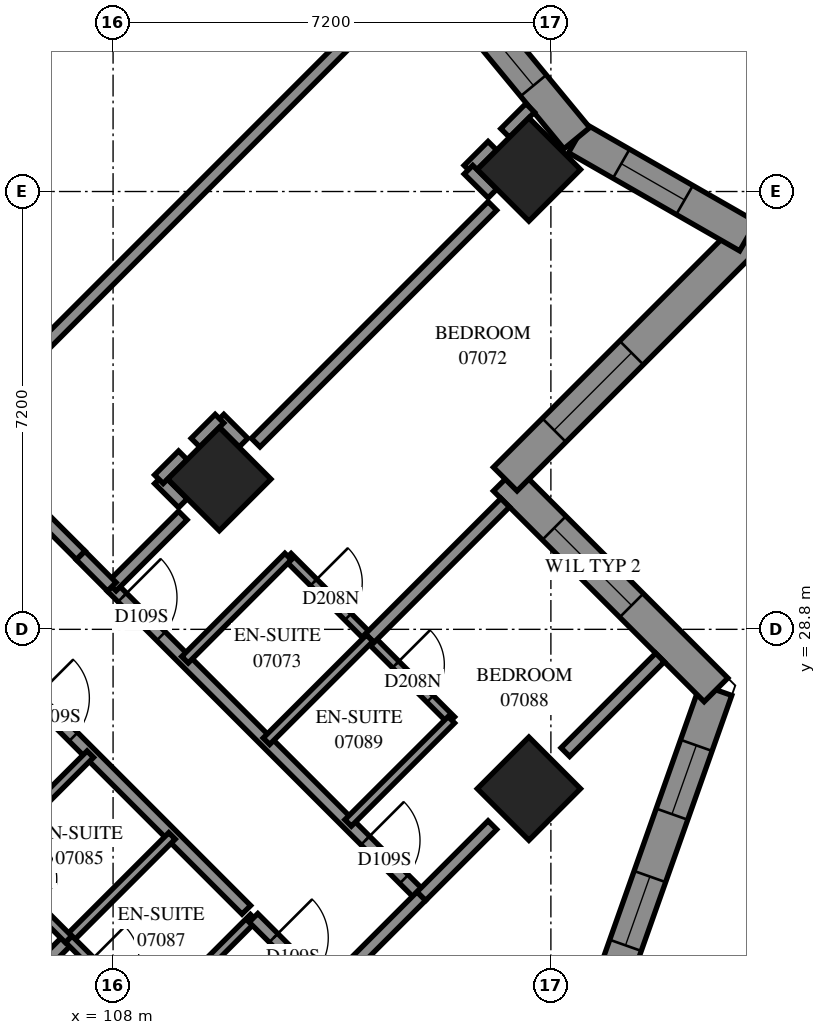
"""IFC4 building model, lengths in metres.
Left out: names, types, materials, properties, quantities, classifications, styles, units other than length and angle.
Written with IfcOpenShell. Run it as: python <this file> out.ifc"""

import sys

from ifc_helpers import new_model, si_unit, direction, frame, frame_2d, origin, origin_2d, place, context, subcontext, project, spatial, polyline, rectangle, outline, extrude, element, fill, save


model = new_model("IFC4")
c1 = context("Model", 3, precision=1e-05, world=origin(), true_north=direction((0.0, 1.0)))
c2 = subcontext(c1, "Body", "Model", "MODEL_VIEW")
j1 = project(units=[si_unit("LENGTHUNIT", "METRE"), si_unit("PLANEANGLEUNIT", "RADIAN")], contexts=[c1])
p1 = place(None, origin())
s1 = spatial("IfcSite", under=j1, at=p1, CompositionType="ELEMENT")
p2 = place(p1, origin())
s2 = spatial("IfcBuilding", under=s1, at=p2, CompositionType="ELEMENT")
p3 = place(p2, frame((0.0, 0.0, 30.4)))
s3 = spatial("IfcBuildingStorey", under=s2, at=p3, CompositionType="ELEMENT", Elevation=30.4)
for number, where, z_axis, x_axis in (
    (1, (114.838, 36.362, 0.0), (0.0, 0.0, 1.0), (0.707, -0.707, 0.0)),
    (2, (109.747, 31.271, 0.0), (0.0, 0.0, 1.0), (0.707, -0.707, 0.0)),
    (3, (114.838, 26.18, 0.0), (0.0, 0.0, 1.0), (0.707, -0.707, 0.0)),
):
    element("IfcColumn", number, at=place(p3, frame(where, z_axis=z_axis, x_axis=x_axis)), inside=s3, PredefinedType="COLUMN", context=c2, shape_type="SweptSolid", body=[
        extrude(rectangle(XDim=1.2, YDim=1.2, at=origin_2d()), origin(), (0.0, 0.0, 1.0), 3.1),
    ])
p4 = place(p3, frame((116.153, 22.831, 0.0), z_axis=(0.0, 0.0, 1.0), x_axis=(0.3338727536, 0.9426181541, 0.0)))
e4 = element("IfcWall", 4, at=p4, inside=s3, PredefinedType="SOLIDWALL", context=c2, shape_type="SweptSolid", body=[
    extrude(outline(polyline([(-0.126, -0.275), (5.45, -0.275), (5.103, 0.275), (0.126, 0.275), (-0.126, -0.275)])), origin(), (0.0, 0.0, 1.0), 3.1),
])
p5 = place(p4, frame((0.819, 0.0, 0.5)))
e5 = element("IfcOpeningElement", 5, at=p5, cuts=e4, PredefinedType="OPENING", context=c2, shape_type="SweptSolid", body=[
    extrude(rectangle(XDim=1.2, YDim=2.45, at=frame_2d((0.6, 1.225))), frame((0.0, 0.285, 0.0), z_axis=(0.0, -1.0, 0.0), x_axis=(1.0, 0.0, 0.0)), (0.0, 0.0, 1.0), 0.57),
])
p6 = place(p4, frame((3.108, 0.0, 0.5)))
e6 = element("IfcOpeningElement", 6, at=p6, cuts=e4, PredefinedType="OPENING", context=c2, shape_type="SweptSolid", body=[
    extrude(rectangle(XDim=1.2, YDim=2.45, at=frame_2d((0.6, 1.225))), frame((0.0, 0.285, 0.0), z_axis=(0.0, -1.0, 0.0), x_axis=(1.0, 0.0, 0.0)), (0.0, 0.0, 1.0), 0.57),
])
p7 = place(p3, frame((117.915, 27.805, 0.0), z_axis=(0.0, 0.0, 1.0), x_axis=(-0.7070965801, 0.7071169822, 0.0)))
e7 = element("IfcWall", 7, at=p7, inside=s3, PredefinedType="SOLIDWALL", context=c2, shape_type="SweptSolid", body=[
    extrude(outline(polyline([(-0.173, -0.275), (4.627, -0.275), (5.176, 0.275), (0.173, 0.275), (-0.173, -0.275)])), origin(), (0.0, 0.0, 1.0), 3.1),
])
p8 = place(p7, frame((1.964, 0.0, 0.6)))
e8 = element("IfcOpeningElement", 8, at=p8, cuts=e7, PredefinedType="OPENING", context=c2, shape_type="SweptSolid", body=[
    extrude(rectangle(XDim=1.8, YDim=1.9, at=frame_2d((0.9, 0.95))), frame((0.0, 0.285, 0.0), z_axis=(0.0, -1.0, 0.0), x_axis=(1.0, 0.0, 0.0)), (0.0, 0.0, 1.0), 0.57),
])
p9 = place(p3, frame((114.449, 31.271, 0.0), z_axis=(0.0, 0.0, 1.0), x_axis=(0.7070979247, 0.7071156376, 0.0)))
e9 = element("IfcWall", 9, at=p9, inside=s3, PredefinedType="SOLIDWALL", context=c2, shape_type="SweptSolid", body=[
    extrude(outline(polyline([(0.275, -0.275), (6.005, -0.275), (5.286, 0.275), (-0.275, 0.275), (0.275, -0.275)])), origin(), (0.0, 0.0, 1.0), 3.1),
])
p10 = place(p9, frame((1.137, 0.0, 0.6)))
e10 = element("IfcOpeningElement", 10, at=p10, cuts=e9, PredefinedType="OPENING", context=c2, shape_type="SweptSolid", body=[
    extrude(rectangle(XDim=1.8, YDim=1.9, at=frame_2d((0.9, 0.95))), frame((0.0, 0.285, 0.0), z_axis=(0.0, -1.0, 0.0), x_axis=(1.0, 0.0, 0.0)), (0.0, 0.0, 1.0), 0.57),
])
p11 = place(p3, frame((118.441, 35.263, 0.0), z_axis=(0.0, 0.0, 1.0), x_axis=(-0.8675063131, 0.4974261721, 0.0)))
e11 = element("IfcWall", 11, at=p11, inside=s3, PredefinedType="SOLIDWALL", context=c2, shape_type="SweptSolid", body=[
    extrude(outline(polyline([(-0.359, -0.275), (3.195, -0.275), (3.295, 0.275), (0.359, 0.275), (-0.359, -0.275)])), origin(), (0.0, 0.0, 1.0), 3.1),
])
p12 = place(p11, frame((1.202, 0.0, 0.5)))
e12 = element("IfcOpeningElement", 12, at=p12, cuts=e11, PredefinedType="OPENING", context=c2, shape_type="SweptSolid", body=[
    extrude(rectangle(XDim=1.2, YDim=2.45, at=frame_2d((0.6, 1.225))), frame((0.0, 0.285, 0.0), z_axis=(0.0, -1.0, 0.0), x_axis=(1.0, 0.0, 0.0)), (0.0, 0.0, 1.0), 0.57),
])
p13 = place(p3, frame((115.626, 36.877, 0.0), z_axis=(0.0, 0.0, 1.0), x_axis=(-0.6361415501, 0.7715723739, 0.0)))
e13 = element("IfcWall", 13, at=p13, inside=s3, PredefinedType="SOLIDWALL", context=c2, shape_type="SweptSolid", body=[
    extrude(outline(polyline([(0.05, -0.275), (3.496, -0.275), (3.443, 0.275), (-0.05, 0.275), (0.05, -0.275)])), origin(), (0.0, 0.0, 1.0), 3.1),
])
p14 = place(p13, frame((1.122, 0.0, 0.5)))
e14 = element("IfcOpeningElement", 14, at=p14, cuts=e13, PredefinedType="OPENING", context=c2, shape_type="SweptSolid", body=[
    extrude(rectangle(XDim=1.2, YDim=2.45, at=frame_2d((0.6, 1.225))), frame((0.0, 0.285, 0.0), z_axis=(0.0, -1.0, 0.0), x_axis=(1.0, 0.0, 0.0)), (0.0, 0.0, 1.0), 0.57),
])
p15 = place(p3, frame((102.609, 31.769, 0.0), z_axis=(0.0, 0.0, 1.0), x_axis=(0.7071067812, -0.7071067812, 0.0)))
e15 = element("IfcWall", 15, at=p15, inside=s3, PredefinedType="PARTITIONING", context=c2, shape_type="SweptSolid", body=[
    extrude(rectangle(XDim=10.723, YDim=0.2, at=frame_2d((5.361, 0.0))), origin(), (0.0, 0.0, 1.0), 3.1),
])
p16 = place(p15, frame((4.15, 0.0, 0.0)))
e16 = element("IfcOpeningElement", 16, at=p16, cuts=e15, PredefinedType="OPENING", context=c2, shape_type="SweptSolid", body=[
    extrude(rectangle(XDim=0.9, YDim=2.1, at=frame_2d((0.45, 1.05))), frame((0.0, 0.11, 0.0), z_axis=(0.0, -1.0, 0.0), x_axis=(1.0, 0.0, 0.0)), (0.0, 0.0, 1.0), 0.22),
])
p17 = place(p15, frame((5.8, 0.0, 0.0)))
e17 = element("IfcOpeningElement", 17, at=p17, cuts=e15, PredefinedType="OPENING", context=c2, shape_type="SweptSolid", body=[
    extrude(rectangle(XDim=0.9, YDim=2.1, at=frame_2d((0.45, 1.05))), frame((0.0, 0.11, 0.0), z_axis=(0.0, -1.0, 0.0), x_axis=(1.0, 0.0, 0.0)), (0.0, 0.0, 1.0), 0.22),
])
p18 = place(p3, frame((105.437, 32.045, 0.0), z_axis=(0.0, 0.0, 1.0), x_axis=(0.7070175341, 0.707196017, 0.0)))
e18 = element("IfcWall", 18, at=p18, inside=s3, PredefinedType="PARTITIONING", context=c2, shape_type="SweptSolid", body=[
    extrude(rectangle(XDim=10.645, YDim=0.2, at=frame_2d((5.323, 0.0))), origin(), (0.0, 0.0, 1.0), 3.1),
])
p19 = place(p3, frame((101.592, 18.033, 0.0), z_axis=(0.0, 0.0, 1.0), x_axis=(0.7072375867, 0.7069759514, 0.0)))
e19 = element("IfcWall", 19, at=p19, inside=s3, PredefinedType="PARTITIONING", context=c2, shape_type="SweptSolid", body=[
    extrude(rectangle(XDim=8.026, YDim=0.2, at=frame_2d((4.013, 0.0))), origin(), (0.0, 0.0, 1.0), 3.1),
])
p20 = place(p3, frame((107.977, 29.499, 0.0), z_axis=(0.0, 0.0, 1.0), x_axis=(0.7071067812, -0.7071067812, 0.0)))
e20 = element("IfcWall", 20, at=p20, inside=s3, PredefinedType="PARTITIONING", context=c2, shape_type="SweptSolid", body=[
    extrude(rectangle(XDim=7.198, YDim=0.2, at=frame_2d((3.599, 0.0))), origin(), (0.0, 0.0, 1.0), 3.1),
])
p21 = place(p20, frame((0.247, 0.0, 0.0)))
e21 = element("IfcOpeningElement", 21, at=p21, cuts=e20, PredefinedType="OPENING", context=c2, shape_type="SweptSolid", body=[
    extrude(rectangle(XDim=0.9, YDim=2.1, at=frame_2d((0.45, 1.05))), frame((0.0, 0.11, 0.0), z_axis=(0.0, -1.0, 0.0), x_axis=(1.0, 0.0, 0.0)), (0.0, 0.0, 1.0), 0.22),
])
p22 = place(p20, frame((5.899, 0.0, 0.0)))
e22 = element("IfcOpeningElement", 22, at=p22, cuts=e20, PredefinedType="OPENING", context=c2, shape_type="SweptSolid", body=[
    extrude(rectangle(XDim=0.9, YDim=2.1, at=frame_2d((0.45, 1.05))), frame((0.0, 0.11, 0.0), z_axis=(0.0, -1.0, 0.0), x_axis=(1.0, 0.0, 0.0)), (0.0, 0.0, 1.0), 0.22),
])
p23 = place(p3, frame((110.345, 31.871, 0.0), z_axis=(0.0, 0.0, 1.0), x_axis=(0.7071067812, 0.7071067812, 0.0)))
e23 = element("IfcWall", 23, at=p23, inside=s3, PredefinedType="PARTITIONING", context=c2, shape_type="SweptSolid", body=[
    extrude(rectangle(XDim=5.504, YDim=0.2, at=frame_2d((2.752, 0.0))), origin(), (0.0, 0.0, 1.0), 3.1),
])
p24 = place(p3, frame((110.875, 29.995, 0.0), z_axis=(0.0, 0.0, 1.0), x_axis=(0.7071067812, -0.7071067812, 0.0)))
e24 = element("IfcWall", 24, at=p24, inside=s3, PredefinedType="PARTITIONING", context=c2, shape_type="SweptSolid", body=[
    extrude(rectangle(XDim=3.801, YDim=0.15, at=frame_2d((1.901, 0.0))), origin(), (0.0, 0.0, 1.0), 3.1),
])
p25 = place(p24, frame((0.598, 0.0, 0.0)))
e25 = element("IfcOpeningElement", 25, at=p25, cuts=e24, PredefinedType="OPENING", context=c2, shape_type="SweptSolid", body=[
    extrude(rectangle(XDim=0.8, YDim=2.1, at=frame_2d((0.4, 1.05))), frame((0.0, 0.085, 0.0), z_axis=(0.0, -1.0, 0.0), x_axis=(1.0, 0.0, 0.0)), (0.0, 0.0, 1.0), 0.17),
])
p26 = place(p24, frame((2.507, 0.0, 0.0)))
e26 = element("IfcOpeningElement", 26, at=p26, cuts=e24, PredefinedType="OPENING", context=c2, shape_type="SweptSolid", body=[
    extrude(rectangle(XDim=0.8, YDim=2.1, at=frame_2d((0.4, 1.05))), frame((0.0, 0.085, 0.0), z_axis=(0.0, -1.0, 0.0), x_axis=(1.0, 0.0, 0.0)), (0.0, 0.0, 1.0), 0.17),
])
p27 = place(p3, frame((112.221, 28.655, 0.0), z_axis=(0.0, 0.0, 1.0), x_axis=(0.7071067812, 0.7071067812, 0.0)))
e27 = element("IfcWall", 27, at=p27, inside=s3, PredefinedType="PARTITIONING", context=c2, shape_type="SweptSolid", body=[
    extrude(rectangle(XDim=3.15, YDim=0.2, at=frame_2d((1.575, 0.0))), origin(), (0.0, 0.0, 1.0), 3.1),
])
p28 = place(p3, frame((105.435, 32.049, 0.0), z_axis=(0.0, 0.0, 1.0), x_axis=(0.7074545101, -0.7067588812, 0.0)))
e28 = element("IfcWall", 28, at=p28, inside=s3, PredefinedType="PARTITIONING", context=c2, shape_type="SweptSolid", body=[
    extrude(rectangle(XDim=2.875, YDim=0.2, at=frame_2d((1.438, 0.0))), origin(), (0.0, 0.0, 1.0), 3.1),
])
for number, where, z_axis, x_axis in (
    (29, (105.927, 25.049, 0.0), (0.0, 0.0, 1.0), (0.707, 0.707, 0.0)),
    (30, (107.271, 23.705, 0.0), (0.0, 0.0, 1.0), (0.707, 0.707, 0.0)),
):
    element("IfcWall", number, at=place(p3, frame(where, z_axis=z_axis, x_axis=x_axis)), inside=s3, PredefinedType="PARTITIONING", context=c2, shape_type="SweptSolid", body=[
        extrude(rectangle(XDim=2.401, YDim=0.15, at=frame_2d((1.201, 0.0))), origin(), (0.0, 0.0, 1.0), 3.1),
    ])
for number, where, z_axis, x_axis in (
    (31, (109.182, 28.3, 0.0), (0.0, 0.0, 1.0), (0.707, 0.708, 0.0)),
    (32, (111.865, 25.616, 0.0), (0.0, 0.0, 1.0), (0.708, 0.707, 0.0)),
    (33, (110.522, 26.96, 0.0), (0.0, 0.0, 1.0), (0.708, 0.707, 0.0)),
):
    element("IfcWall", number, at=place(p3, frame(where, z_axis=z_axis, x_axis=x_axis)), inside=s3, PredefinedType="PARTITIONING", context=c2, shape_type="SweptSolid", body=[
        extrude(rectangle(XDim=2.4, YDim=0.15, at=frame_2d((1.2, 0.0))), origin(), (0.0, 0.0, 1.0), 3.1),
    ])
p29 = place(p3, frame((108.615, 22.363, 0.0), z_axis=(0.0, 0.0, 1.0), x_axis=(0.7071067812, 0.7071067812, 0.0)))
e34 = element("IfcWall", 34, at=p29, inside=s3, PredefinedType="PARTITIONING", context=c2, shape_type="SweptSolid", body=[
    extrude(rectangle(XDim=2.398, YDim=0.15, at=frame_2d((1.199, 0.0))), origin(), (0.0, 0.0, 1.0), 3.1),
])
p30 = place(p3, frame((111.513, 22.857, 0.0), z_axis=(0.0, 0.0, 1.0), x_axis=(0.7071067812, 0.7071067812, 0.0)))
e35 = element("IfcWall", 35, at=p30, inside=s3, PredefinedType="PARTITIONING", context=c2, shape_type="SweptSolid", body=[
    extrude(rectangle(XDim=2.2, YDim=0.2, at=frame_2d((1.1, 0.0))), origin(), (0.0, 0.0, 1.0), 2.6),
])
p31 = place(p3, frame((115.438, 26.78, 0.0), z_axis=(0.0, 0.0, 1.0), x_axis=(0.7071067812, 0.7071067812, 0.0)))
e36 = element("IfcWall", 36, at=p31, inside=s3, PredefinedType="PARTITIONING", context=c2, shape_type="SweptSolid", body=[
    extrude(rectangle(XDim=2.201, YDim=0.2, at=frame_2d((1.101, 0.0))), origin(), (0.0, 0.0, 1.0), 3.1),
])
p32 = place(p3, frame((105.925, 25.045, 0.0), z_axis=(0.0, 0.0, 1.0), x_axis=(0.7071067812, -0.7071067812, 0.0)))
e37 = element("IfcWall", 37, at=p32, inside=s3, PredefinedType="PARTITIONING", context=c2, shape_type="SweptSolid", body=[
    extrude(rectangle(XDim=1.901, YDim=0.15, at=frame_2d((0.95, 0.0))), origin(), (0.0, 0.0, 1.0), 3.1),
])
p33 = place(p32, frame((0.493, 0.0, 0.0)))
e38 = element("IfcOpeningElement", 38, at=p33, cuts=e37, PredefinedType="OPENING", context=c2, shape_type="SweptSolid", body=[
    extrude(rectangle(XDim=0.8, YDim=2.1, at=frame_2d((0.4, 1.05))), frame((0.0, 0.085, 0.0), z_axis=(0.0, -1.0, 0.0), x_axis=(1.0, 0.0, 0.0)), (0.0, 0.0, 1.0), 0.17),
])
p34 = place(p3, frame((107.272, 23.704, 0.0), z_axis=(0.0, 0.0, 1.0), x_axis=(0.7076330979, -0.7065800724, 0.0)))
e39 = element("IfcWall", 39, at=p34, inside=s3, PredefinedType="PARTITIONING", context=c2, shape_type="SweptSolid", body=[
    extrude(rectangle(XDim=1.899, YDim=0.15, at=frame_2d((0.95, 0.0))), origin(), (0.0, 0.0, 1.0), 3.1),
])
p35 = place(p34, frame((0.503, 0.0, 0.0)))
e40 = element("IfcOpeningElement", 40, at=p35, cuts=e39, PredefinedType="OPENING", context=c2, shape_type="SweptSolid", body=[
    extrude(rectangle(XDim=0.8, YDim=2.1, at=frame_2d((0.4, 1.05))), frame((0.0, 0.085, 0.0), z_axis=(0.0, -1.0, 0.0), x_axis=(1.0, 0.0, 0.0)), (0.0, 0.0, 1.0), 0.17),
])
p36 = place(p3, frame((110.309, 24.055, 0.0), z_axis=(0.0, 0.0, 1.0), x_axis=(0.7071067812, -0.7071067812, 0.0)))
e41 = element("IfcWall", 41, at=p36, inside=s3, PredefinedType="PARTITIONING", context=c2, shape_type="SweptSolid", body=[
    extrude(rectangle(XDim=1.7, YDim=0.2, at=frame_2d((0.85, 0.0))), origin(), (0.0, 0.0, 1.0), 3.1),
])
p37 = place(p36, frame((0.467, 0.0, 0.0)))
e42 = element("IfcOpeningElement", 42, at=p37, cuts=e41, PredefinedType="OPENING", context=c2, shape_type="SweptSolid", body=[
    extrude(rectangle(XDim=0.9, YDim=2.1, at=frame_2d((0.45, 1.05))), frame((0.0, 0.11, 0.0), z_axis=(0.0, -1.0, 0.0), x_axis=(1.0, 0.0, 0.0)), (0.0, 0.0, 1.0), 0.22),
])
p38 = place(p3, frame((113.07, 24.413, 0.0), z_axis=(0.0, 0.0, 1.0), x_axis=(0.7071067812, 0.7071067812, 0.0)))
e43 = element("IfcWall", 43, at=p38, inside=s3, PredefinedType="PARTITIONING", context=c2, shape_type="SweptSolid", body=[
    extrude(rectangle(XDim=1.652, YDim=0.2, at=frame_2d((0.826, 0.0))), origin(), (0.0, 0.0, 1.0), 2.6),
])
p39 = place(p3, frame((107.978, 29.504, 0.0), z_axis=(0.0, 0.0, 1.0), x_axis=(0.7071067812, 0.7071067812, 0.0)))
e44 = element("IfcWall", 44, at=p39, inside=s3, PredefinedType="PARTITIONING", context=c2, shape_type="SweptSolid", body=[
    extrude(rectangle(XDim=1.652, YDim=0.2, at=frame_2d((0.826, 0.0))), origin(), (0.0, 0.0, 1.0), 3.1),
])
p40 = place(p3, frame((107.466, 30.014, 0.0), z_axis=(0.0, 0.0, 1.0), x_axis=(0.7057270646, -0.7084838109, 0.0)))
e45 = element("IfcWall", 45, at=p40, inside=s3, PredefinedType="PARTITIONING", context=c2, shape_type="SweptSolid", body=[
    extrude(rectangle(XDim=0.726, YDim=0.2, at=frame_2d((0.363, 0.0))), origin(), (0.0, 0.0, 1.0), 3.1),
])
for number, where, z_axis, x_axis in (
    (46, (113.843, 36.359, 0.0), (0.0, 0.0, 1.0), (0.707, 0.707, 0.0)),
    (47, (108.754, 31.268, 0.0), (0.0, 0.0, 1.0), (0.707, -0.707, 0.0)),
    (48, (109.751, 32.265, 0.0), (0.0, 0.0, 1.0), (0.707, -0.707, 0.0)),
    (49, (109.355, 31.871, 0.0), (0.0, 0.0, 1.0), (0.707, 0.707, 0.0)),
    (50, (108.753, 31.269, 0.0), (0.0, 0.0, 1.0), (0.707, 0.707, 0.0)),
):
    element("IfcWall", number, at=place(p3, frame(where, z_axis=z_axis, x_axis=x_axis)), inside=s3, PredefinedType="PARTITIONING", context=c2, shape_type="SweptSolid", body=[
        extrude(rectangle(XDim=0.557, YDim=0.2, at=frame_2d((0.279, 0.0))), origin(), (0.0, 0.0, 1.0), 3.1),
    ])
p41 = place(p3, frame((113.845, 36.359, 0.0), z_axis=(0.0, 0.0, 1.0), x_axis=(0.7089037401, -0.705305244, 0.0)))
e51 = element("IfcWall", 51, at=p41, inside=s3, PredefinedType="PARTITIONING", context=c2, shape_type="SweptSolid", body=[
    extrude(rectangle(XDim=0.556, YDim=0.2, at=frame_2d((0.278, 0.0))), origin(), (0.0, 0.0, 1.0), 3.1),
])
p42 = place(p3, frame((114.447, 36.963, 0.0), z_axis=(0.0, 0.0, 1.0), x_axis=(0.7071067812, 0.7071067812, 0.0)))
e52 = element("IfcWall", 52, at=p42, inside=s3, PredefinedType="PARTITIONING", context=c2, shape_type="SweptSolid", body=[
    extrude(rectangle(XDim=0.583, YDim=0.2, at=frame_2d((0.291, 0.0))), origin(), (0.0, 0.0, 1.0), 3.1),
])
p43 = place(p5, origin())
e53 = element("IfcWindow", 53, at=p43, inside=s3, PartitioningType="SINGLE_PANEL", PredefinedType="WINDOW", context=c2, shape_type="SweptSolid", body=[
    extrude(rectangle(XDim=1.2, YDim=2.45, at=frame_2d((0.6, 1.225))), frame((0.0, 0.155, 0.0), z_axis=(0.0, -1.0, 0.0), x_axis=(1.0, 0.0, 0.0)), (0.0, 0.0, 1.0), 0.06),
])
fill(e5, e53)
p44 = place(p6, origin())
e54 = element("IfcWindow", 54, at=p44, inside=s3, PartitioningType="SINGLE_PANEL", PredefinedType="WINDOW", context=c2, shape_type="SweptSolid", body=[
    extrude(rectangle(XDim=1.2, YDim=2.45, at=frame_2d((0.6, 1.225))), frame((0.0, 0.155, 0.0), z_axis=(0.0, -1.0, 0.0), x_axis=(1.0, 0.0, 0.0)), (0.0, 0.0, 1.0), 0.06),
])
fill(e6, e54)
p45 = place(p8, origin())
e55 = element("IfcWindow", 55, at=p45, inside=s3, PartitioningType="SINGLE_PANEL", PredefinedType="WINDOW", context=c2, shape_type="SweptSolid", body=[
    extrude(rectangle(XDim=1.8, YDim=1.9, at=frame_2d((0.9, 0.95))), frame((0.0, 0.155, 0.0), z_axis=(0.0, -1.0, 0.0), x_axis=(1.0, 0.0, 0.0)), (0.0, 0.0, 1.0), 0.06),
])
fill(e8, e55)
p46 = place(p10, origin())
e56 = element("IfcWindow", 56, at=p46, inside=s3, PartitioningType="SINGLE_PANEL", PredefinedType="WINDOW", context=c2, shape_type="SweptSolid", body=[
    extrude(rectangle(XDim=1.8, YDim=1.9, at=frame_2d((0.9, 0.95))), frame((0.0, 0.155, 0.0), z_axis=(0.0, -1.0, 0.0), x_axis=(1.0, 0.0, 0.0)), (0.0, 0.0, 1.0), 0.06),
])
fill(e10, e56)
p47 = place(p12, origin())
e57 = element("IfcWindow", 57, at=p47, inside=s3, PartitioningType="SINGLE_PANEL", PredefinedType="WINDOW", context=c2, shape_type="SweptSolid", body=[
    extrude(rectangle(XDim=1.2, YDim=2.45, at=frame_2d((0.6, 1.225))), frame((0.0, 0.155, 0.0), z_axis=(0.0, -1.0, 0.0), x_axis=(1.0, 0.0, 0.0)), (0.0, 0.0, 1.0), 0.06),
])
fill(e12, e57)
p48 = place(p14, origin())
e58 = element("IfcWindow", 58, at=p48, inside=s3, PartitioningType="SINGLE_PANEL", PredefinedType="WINDOW", context=c2, shape_type="SweptSolid", body=[
    extrude(rectangle(XDim=1.2, YDim=2.45, at=frame_2d((0.6, 1.225))), frame((0.0, 0.155, 0.0), z_axis=(0.0, -1.0, 0.0), x_axis=(1.0, 0.0, 0.0)), (0.0, 0.0, 1.0), 0.06),
])
fill(e14, e58)
p49 = place(p21, origin())
e59 = element("IfcDoor", 59, at=p49, inside=s3, OperationType="SINGLE_SWING_LEFT", PredefinedType="DOOR", context=c2, shape_type="SweptSolid", body=[
    extrude(rectangle(XDim=0.9, YDim=2.1, at=frame_2d((0.45, 1.05))), frame((0.0, 0.025, 0.0), z_axis=(0.0, -1.0, 0.0), x_axis=(1.0, 0.0, 0.0)), (0.0, 0.0, 1.0), 0.05),
])
fill(e21, e59)
p50 = place(p25, origin())
e60 = element("IfcDoor", 60, at=p50, inside=s3, OperationType="SINGLE_SWING_RIGHT", PredefinedType="DOOR", context=c2, shape_type="SweptSolid", body=[
    extrude(rectangle(XDim=0.8, YDim=2.1, at=frame_2d((0.4, 1.05))), frame((0.0, 0.025, 0.0), z_axis=(0.0, -1.0, 0.0), x_axis=(1.0, 0.0, 0.0)), (0.0, 0.0, 1.0), 0.05),
])
fill(e25, e60)
p51 = place(p17, origin())
e61 = element("IfcDoor", 61, at=p51, inside=s3, OperationType="SINGLE_SWING_RIGHT", PredefinedType="DOOR", context=c2, shape_type="SweptSolid", body=[
    extrude(rectangle(XDim=0.9, YDim=2.1, at=frame_2d((0.45, 1.05))), frame((0.0, 0.025, 0.0), z_axis=(0.0, -1.0, 0.0), x_axis=(1.0, 0.0, 0.0)), (0.0, 0.0, 1.0), 0.05),
])
fill(e17, e61)
p52 = place(p37, origin())
e62 = element("IfcDoor", 62, at=p52, inside=s3, OperationType="SINGLE_SWING_LEFT", PredefinedType="DOOR", context=c2, shape_type="SweptSolid", body=[
    extrude(rectangle(XDim=0.9, YDim=2.1, at=frame_2d((0.45, 1.05))), frame((0.0, 0.025, 0.0), z_axis=(0.0, -1.0, 0.0), x_axis=(1.0, 0.0, 0.0)), (0.0, 0.0, 1.0), 0.05),
])
fill(e42, e62)
p53 = place(p22, origin())
e63 = element("IfcDoor", 63, at=p53, inside=s3, OperationType="SINGLE_SWING_RIGHT", PredefinedType="DOOR", context=c2, shape_type="SweptSolid", body=[
    extrude(rectangle(XDim=0.9, YDim=2.1, at=frame_2d((0.45, 1.05))), frame((0.0, 0.025, 0.0), z_axis=(0.0, -1.0, 0.0), x_axis=(1.0, 0.0, 0.0)), (0.0, 0.0, 1.0), 0.05),
])
fill(e22, e63)
p54 = place(p26, origin())
e64 = element("IfcDoor", 64, at=p54, inside=s3, OperationType="SINGLE_SWING_RIGHT", PredefinedType="DOOR", context=c2, shape_type="SweptSolid", body=[
    extrude(rectangle(XDim=0.8, YDim=2.1, at=frame_2d((0.4, 1.05))), frame((0.0, 0.025, 0.0), z_axis=(0.0, -1.0, 0.0), x_axis=(1.0, 0.0, 0.0)), (0.0, 0.0, 1.0), 0.05),
])
fill(e26, e64)
save(model, sys.argv[1])
